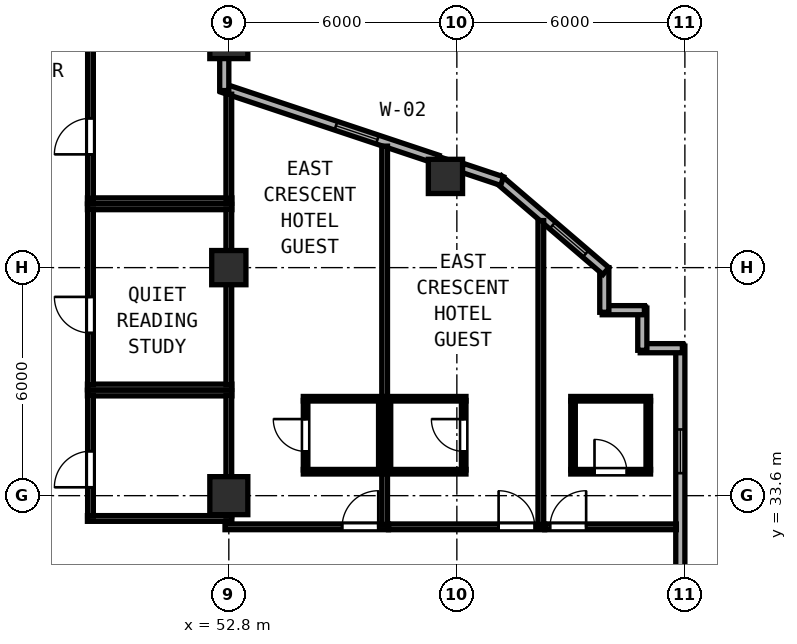
"""IFC4 building model, lengths in metres.
Left out: names, types, materials, properties, quantities, classifications, styles, units other than length and angle.
Written with IfcOpenShell. Run it as: python <this file> out.ifc"""

import sys

from ifc_helpers import new_model, si_unit, direction, frame, frame_2d, origin, origin_2d, place, context, subcontext, project, spatial, rectangle, hollow_rectangle, extrude, element, fill, save


model = new_model("IFC4")
c1 = context("Model", 3, precision=1e-05, world=origin(), true_north=direction((0.0, 1.0)))
c2 = subcontext(c1, "Body", "Model", "MODEL_VIEW")
j1 = project(units=[si_unit("LENGTHUNIT", "METRE"), si_unit("PLANEANGLEUNIT", "RADIAN")], contexts=[c1])
p1 = place(None, origin())
s1 = spatial("IfcSite", under=j1, at=p1, CompositionType="ELEMENT")
p2 = place(p1, origin())
s2 = spatial("IfcBuilding", under=s1, at=p2, CompositionType="ELEMENT")
p3 = place(p2, frame((0.0, 0.0, 152.4)))
s3 = spatial("IfcBuildingStorey", under=s2, at=p3, CompositionType="ELEMENT", Elevation=152.4)
for number, where, z_axis, x_axis in (
    (1, (52.8, 33.6, 0.0), (0.0, 0.0, 1.0), (1.0, 0.0, 0.0)),
    (2, (52.8, 45.6, 0.0), (0.0, 0.0, 1.0), (1.0, 0.0, 0.0)),
):
    element("IfcColumn", number, at=place(p3, frame(where, z_axis=z_axis, x_axis=x_axis)), inside=s3, PredefinedType="COLUMN", context=c2, shape_type="SweptSolid", body=[
        extrude(hollow_rectangle(XDim=1.0, YDim=1.0, WallThickness=0.038, at=origin_2d()), origin(), (0.0, 0.0, 1.0), 3.8),
    ])
for number, where, z_axis, x_axis in (
    (3, (52.8, 39.6, 0.0), (0.0, 0.0, 1.0), (1.0, 0.0, 0.0)),
    (4, (58.5, 42.0, 0.0), (0.0, 0.0, 1.0), (1.0, 0.0, 0.0)),
):
    element("IfcColumn", number, at=place(p3, frame(where, z_axis=z_axis, x_axis=x_axis)), inside=s3, PredefinedType="COLUMN", context=c2, shape_type="SweptSolid", body=[
        extrude(hollow_rectangle(XDim=0.9, YDim=0.9, WallThickness=0.034, at=origin_2d()), origin(), (0.0, 0.0, 1.0), 3.8),
    ])
p4 = place(p3, frame((64.68, 28.092, 0.0), z_axis=(0.0, 0.0, 1.0), x_axis=(0.0, 1.0, 0.0)))
e5 = element("IfcWall", 5, at=p4, inside=s3, PredefinedType="SOLIDWALL", context=c2, shape_type="SweptSolid", body=[
    extrude(rectangle(XDim=9.443, YDim=0.24, at=frame_2d((4.721, 0.0))), origin(), (0.0, 0.0, 1.0), 3.6),
])
p5 = place(p4, frame((0.7, 0.0, 0.85)))
e6 = element("IfcOpeningElement", 6, at=p5, cuts=e5, PredefinedType="OPENING", context=c2, shape_type="SweptSolid", body=[
    extrude(rectangle(XDim=1.15, YDim=1.8, at=frame_2d((0.575, 0.9))), frame((0.0, 0.13, 0.0), z_axis=(0.0, -1.0, 0.0), x_axis=(1.0, 0.0, 0.0)), (0.0, 0.0, 1.0), 0.26),
])
p6 = place(p4, frame((6.1, 0.0, 0.85)))
e7 = element("IfcOpeningElement", 7, at=p6, cuts=e5, PredefinedType="OPENING", context=c2, shape_type="SweptSolid", body=[
    extrude(rectangle(XDim=1.15, YDim=1.8, at=frame_2d((0.575, 0.9))), frame((0.0, 0.13, 0.0), z_axis=(0.0, -1.0, 0.0), x_axis=(1.0, 0.0, 0.0)), (0.0, 0.0, 1.0), 0.26),
])
p7 = place(p3, frame((64.735, 37.48, 0.0), z_axis=(0.0, 0.0, 1.0), x_axis=(-1.0, 0.0, 0.0)))
e8 = element("IfcWall", 8, at=p7, inside=s3, PredefinedType="SOLIDWALL", context=c2, shape_type="SweptSolid", body=[
    extrude(rectangle(XDim=1.11, YDim=0.24, at=frame_2d((0.555, 0.0))), origin(), (0.0, 0.0, 1.0), 3.6),
])
p8 = place(p3, frame((63.68, 37.425, 0.0), z_axis=(0.0, 0.0, 1.0), x_axis=(0.0, 1.0, 0.0)))
e9 = element("IfcWall", 9, at=p8, inside=s3, PredefinedType="SOLIDWALL", context=c2, shape_type="SweptSolid", body=[
    extrude(rectangle(XDim=1.11, YDim=0.24, at=frame_2d((0.555, 0.0))), origin(), (0.0, 0.0, 1.0), 3.6),
])
p9 = place(p3, frame((63.735, 38.48, 0.0), z_axis=(0.0, 0.0, 1.0), x_axis=(-1.0, 0.0, 0.0)))
e10 = element("IfcWall", 10, at=p9, inside=s3, PredefinedType="SOLIDWALL", context=c2, shape_type="SweptSolid", body=[
    extrude(rectangle(XDim=1.11, YDim=0.24, at=frame_2d((0.555, 0.0))), origin(), (0.0, 0.0, 1.0), 3.6),
])
p10 = place(p3, frame((62.68, 38.425, 0.0), z_axis=(0.0, 0.0, 1.0), x_axis=(0.0, 1.0, 0.0)))
e11 = element("IfcWall", 11, at=p10, inside=s3, PredefinedType="SOLIDWALL", context=c2, shape_type="SweptSolid", body=[
    extrude(rectangle(XDim=1.175, YDim=0.24, at=frame_2d((0.587, 0.0))), origin(), (0.0, 0.0, 1.0), 3.6),
])
p11 = place(p3, frame((62.722, 39.509, 0.0), z_axis=(0.0, 0.0, 1.0), x_axis=(-0.759247334792, 0.650802185469, 0.0)))
e12 = element("IfcWall", 12, at=p11, inside=s3, PredefinedType="SOLIDWALL", context=c2, shape_type="SweptSolid", body=[
    extrude(rectangle(XDim=3.719, YDim=0.24, at=frame_2d((1.86, 0.0))), origin(), (0.0, 0.0, 1.0), 3.6),
])
p12 = place(p11, frame((0.7, 0.0, 0.85)))
e13 = element("IfcOpeningElement", 13, at=p12, cuts=e12, PredefinedType="OPENING", context=c2, shape_type="SweptSolid", body=[
    extrude(rectangle(XDim=1.15, YDim=1.8, at=frame_2d((0.575, 0.9))), frame((0.0, 0.13, 0.0), z_axis=(0.0, -1.0, 0.0), x_axis=(1.0, 0.0, 0.0)), (0.0, 0.0, 1.0), 0.26),
])
p13 = place(p3, frame((59.992, 41.876, 0.0), z_axis=(0.0, 0.0, 1.0), x_axis=(-0.948661238983, 0.316293935527, 0.0)))
e14 = element("IfcWall", 14, at=p13, inside=s3, PredefinedType="SOLIDWALL", context=c2, shape_type="SweptSolid", body=[
    extrude(rectangle(XDim=1.107, YDim=0.24, at=frame_2d((0.553, 0.0))), origin(), (0.0, 0.0, 1.0), 3.6),
])
p14 = place(p3, frame((58.295, 42.442, 0.0), z_axis=(0.0, 0.0, 1.0), x_axis=(-0.948687385027, 0.316215504823, 0.0)))
e15 = element("IfcWall", 15, at=p14, inside=s3, PredefinedType="SOLIDWALL", context=c2, shape_type="SweptSolid", body=[
    extrude(rectangle(XDim=5.973, YDim=0.24, at=frame_2d((2.987, 0.0))), origin(), (0.0, 0.0, 1.0), 3.145),
])
p15 = place(p14, frame((1.67, 0.0, 0.85)))
e16 = element("IfcOpeningElement", 16, at=p15, cuts=e15, PredefinedType="OPENING", context=c2, shape_type="SweptSolid", body=[
    extrude(rectangle(XDim=1.15, YDim=1.8, at=frame_2d((0.575, 0.9))), frame((0.0, 0.13, 0.0), z_axis=(0.0, -1.0, 0.0), x_axis=(1.0, 0.0, 0.0)), (0.0, 0.0, 1.0), 0.26),
])
p16 = place(p3, frame((52.68, 44.259, 0.0), z_axis=(0.0, 0.0, 1.0), x_axis=(0.0, 1.0, 0.0)))
e17 = element("IfcWall", 17, at=p16, inside=s3, PredefinedType="SOLIDWALL", context=c2, shape_type="SweptSolid", body=[
    extrude(rectangle(XDim=0.849, YDim=0.24, at=frame_2d((0.425, 0.0))), origin(), (0.0, 0.0, 1.0), 3.145),
])
for number, where, z_axis, x_axis in (
    (18, (49.08, 36.3, 0.0), (0.0, 0.0, 1.0), (1.0, 0.0, 0.0)),
    (19, (49.08, 33.0, 0.0), (0.0, 0.0, 1.0), (1.0, 0.0, 0.0)),
):
    element("IfcWall", number, at=place(p3, frame(where, z_axis=z_axis, x_axis=x_axis)), inside=s3, PredefinedType="PARTITIONING", context=c2, shape_type="SweptSolid", body=[
        extrude(rectangle(XDim=3.8, YDim=0.15, at=frame_2d((1.9, 0.0))), origin(), (0.0, 0.0, 1.0), 3.6),
    ])
p17 = place(p3, frame((49.16, 33.06, 0.0), z_axis=(0.0, 0.0, 1.0), x_axis=(0.0, 1.0, 0.0)))
e20 = element("IfcWall", 20, at=p17, inside=s3, PredefinedType="PARTITIONING", context=c2, shape_type="SweptSolid", body=[
    extrude(rectangle(XDim=3.18, YDim=0.15, at=frame_2d((1.59, 0.0))), origin(), (0.0, 0.0, 1.0), 3.6),
])
p18 = place(p17, frame((0.76, 0.0, 0.0)))
e21 = element("IfcOpeningElement", 21, at=p18, cuts=e20, PredefinedType="OPENING", context=c2, shape_type="SweptSolid", body=[
    extrude(rectangle(XDim=0.95, YDim=2.12, at=frame_2d((0.475, 1.06))), frame((0.0, 0.085, 0.0), z_axis=(0.0, -1.0, 0.0), x_axis=(1.0, 0.0, 0.0)), (0.0, 0.0, 1.0), 0.17),
])
p19 = place(p3, frame((52.8, 33.06, 0.0), z_axis=(0.0, 0.0, 1.0), x_axis=(0.0, 1.0, 0.0)))
e22 = element("IfcWall", 22, at=p19, inside=s3, PredefinedType="PARTITIONING", context=c2, shape_type="SweptSolid", body=[
    extrude(rectangle(XDim=3.18, YDim=0.15, at=frame_2d((1.59, 0.0))), origin(), (0.0, 0.0, 1.0), 3.145),
])
for number, where, z_axis, x_axis in (
    (23, (49.08, 41.2, 0.0), (0.0, 0.0, 1.0), (1.0, 0.0, 0.0)),
    (24, (49.08, 36.46, 0.0), (0.0, 0.0, 1.0), (1.0, 0.0, 0.0)),
):
    element("IfcWall", number, at=place(p3, frame(where, z_axis=z_axis, x_axis=x_axis)), inside=s3, PredefinedType="PARTITIONING", context=c2, shape_type="SweptSolid", body=[
        extrude(rectangle(XDim=3.8, YDim=0.15, at=frame_2d((1.9, 0.0))), origin(), (0.0, 0.0, 1.0), 3.6),
    ])
p20 = place(p3, frame((49.16, 36.52, 0.0), z_axis=(0.0, 0.0, 1.0), x_axis=(0.0, 1.0, 0.0)))
e25 = element("IfcWall", 25, at=p20, inside=s3, PredefinedType="PARTITIONING", context=c2, shape_type="SweptSolid", body=[
    extrude(rectangle(XDim=4.62, YDim=0.15, at=frame_2d((2.31, 0.0))), origin(), (0.0, 0.0, 1.0), 3.6),
])
p21 = place(p20, frame((1.36, 0.0, 0.0)))
e26 = element("IfcOpeningElement", 26, at=p21, cuts=e25, PredefinedType="OPENING", context=c2, shape_type="SweptSolid", body=[
    extrude(rectangle(XDim=0.95, YDim=2.12, at=frame_2d((0.475, 1.06))), frame((0.0, 0.085, 0.0), z_axis=(0.0, -1.0, 0.0), x_axis=(1.0, 0.0, 0.0)), (0.0, 0.0, 1.0), 0.17),
])
p22 = place(p3, frame((52.8, 36.52, 0.0), z_axis=(0.0, 0.0, 1.0), x_axis=(0.0, 1.0, 0.0)))
e27 = element("IfcWall", 27, at=p22, inside=s3, PredefinedType="PARTITIONING", context=c2, shape_type="SweptSolid", body=[
    extrude(rectangle(XDim=4.62, YDim=0.15, at=frame_2d((2.31, 0.0))), origin(), (0.0, 0.0, 1.0), 3.145),
])
p23 = place(p3, frame((49.08, 41.36, 0.0), z_axis=(0.0, 0.0, 1.0), x_axis=(1.0, 0.0, 0.0)))
e28 = element("IfcWall", 28, at=p23, inside=s3, PredefinedType="PARTITIONING", context=c2, shape_type="SweptSolid", body=[
    extrude(rectangle(XDim=3.8, YDim=0.15, at=frame_2d((1.9, 0.0))), origin(), (0.0, 0.0, 1.0), 3.6),
])
p24 = place(p3, frame((49.16, 41.42, 0.0), z_axis=(0.0, 0.0, 1.0), x_axis=(0.0, 1.0, 0.0)))
e29 = element("IfcWall", 29, at=p24, inside=s3, PredefinedType="PARTITIONING", context=c2, shape_type="SweptSolid", body=[
    extrude(rectangle(XDim=4.54, YDim=0.15, at=frame_2d((2.27, 0.0))), origin(), (0.0, 0.0, 1.0), 3.6),
])
p25 = place(p24, frame((1.16, 0.0, 0.0)))
e30 = element("IfcOpeningElement", 30, at=p25, cuts=e29, PredefinedType="OPENING", context=c2, shape_type="SweptSolid", body=[
    extrude(rectangle(XDim=0.95, YDim=2.12, at=frame_2d((0.475, 1.06))), frame((0.0, 0.085, 0.0), z_axis=(0.0, -1.0, 0.0), x_axis=(1.0, 0.0, 0.0)), (0.0, 0.0, 1.0), 0.17),
])
p26 = place(p3, frame((52.8, 41.42, 0.0), z_axis=(0.0, 0.0, 1.0), x_axis=(0.0, 1.0, 0.0)))
e31 = element("IfcWall", 31, at=p26, inside=s3, PredefinedType="PARTITIONING", context=c2, shape_type="SweptSolid", body=[
    extrude(rectangle(XDim=2.743, YDim=0.15, at=frame_2d((1.372, 0.0))), origin(), (0.0, 0.0, 1.0), 3.145),
])
p27 = place(p3, frame((52.7, 32.78, 0.0), z_axis=(0.0, 0.0, 1.0), x_axis=(1.0, 0.0, 0.0)))
e32 = element("IfcWall", 32, at=p27, inside=s3, PredefinedType="PARTITIONING", context=c2, shape_type="SweptSolid", body=[
    extrude(rectangle(XDim=4.3, YDim=0.15, at=frame_2d((2.15, 0.0))), origin(), (0.0, 0.0, 1.0), 3.6),
])
p28 = place(p27, frame((3.082, 0.0, 0.0)))
e33 = element("IfcOpeningElement", 33, at=p28, cuts=e32, PredefinedType="OPENING", context=c2, shape_type="SweptSolid", body=[
    extrude(rectangle(XDim=0.95, YDim=2.15, at=frame_2d((0.475, 1.075))), frame((0.0, 0.085, 0.0), z_axis=(0.0, -1.0, 0.0), x_axis=(1.0, 0.0, 0.0)), (0.0, 0.0, 1.0), 0.17),
])
p29 = place(p3, frame((56.9, 32.84, 0.0), z_axis=(0.0, 0.0, 1.0), x_axis=(0.0, 1.0, 0.0)))
e34 = element("IfcWall", 34, at=p29, inside=s3, PredefinedType="PARTITIONING", context=c2, shape_type="SweptSolid", body=[
    extrude(rectangle(XDim=9.956, YDim=0.15, at=frame_2d((4.978, 0.0))), origin(), (0.0, 0.0, 1.0), 3.6),
])
for number, where, z_axis, x_axis in (
    (35, (54.76, 36.15, 0.0), (0.0, 0.0, 1.0), (1.0, 0.0, 0.0)),
    (36, (54.76, 34.23, 0.0), (0.0, 0.0, 1.0), (1.0, 0.0, 0.0)),
):
    element("IfcWall", number, at=place(p3, frame(where, z_axis=z_axis, x_axis=x_axis)), inside=s3, PredefinedType="PARTITIONING", context=c2, shape_type="SweptSolid", body=[
        extrude(rectangle(XDim=2.08, YDim=0.12, at=frame_2d((1.04, 0.0))), origin(), (0.0, 0.0, 1.0), 3.6),
    ])
p30 = place(p3, frame((54.82, 34.275, 0.0), z_axis=(0.0, 0.0, 1.0), x_axis=(0.0, 1.0, 0.0)))
e37 = element("IfcWall", 37, at=p30, inside=s3, PredefinedType="PARTITIONING", context=c2, shape_type="SweptSolid", body=[
    extrude(rectangle(XDim=1.83, YDim=0.12, at=frame_2d((0.915, 0.0))), origin(), (0.0, 0.0, 1.0), 3.6),
])
p31 = place(p30, frame((1.34, 0.0, 0.0), z_axis=(0.0, 0.0, 1.0), x_axis=(-1.0, 0.0, 0.0)))
e38 = element("IfcOpeningElement", 38, at=p31, cuts=e37, PredefinedType="OPENING", context=c2, shape_type="SweptSolid", body=[
    extrude(rectangle(XDim=0.85, YDim=2.1, at=frame_2d((0.425, 1.05))), frame((0.0, 0.07, 0.0), z_axis=(0.0, -1.0, 0.0), x_axis=(1.0, 0.0, 0.0)), (0.0, 0.0, 1.0), 0.14),
])
p32 = place(p3, frame((56.8, 34.275, 0.0), z_axis=(0.0, 0.0, 1.0), x_axis=(0.0, 1.0, 0.0)))
e39 = element("IfcWall", 39, at=p32, inside=s3, PredefinedType="PARTITIONING", context=c2, shape_type="SweptSolid", body=[
    extrude(rectangle(XDim=1.83, YDim=0.12, at=frame_2d((0.915, 0.0))), origin(), (0.0, 0.0, 1.0), 3.6),
])
p33 = place(p3, frame((57.002, 32.78, 0.0), z_axis=(0.0, 0.0, 1.0), x_axis=(1.0, 0.0, 0.0)))
e40 = element("IfcWall", 40, at=p33, inside=s3, PredefinedType="PARTITIONING", context=c2, shape_type="SweptSolid", body=[
    extrude(rectangle(XDim=4.108, YDim=0.15, at=frame_2d((2.054, 0.0))), origin(), (0.0, 0.0, 1.0), 3.6),
])
p34 = place(p33, frame((2.896, 0.0, 0.0)))
e41 = element("IfcOpeningElement", 41, at=p34, cuts=e40, PredefinedType="OPENING", context=c2, shape_type="SweptSolid", body=[
    extrude(rectangle(XDim=0.95, YDim=2.15, at=frame_2d((0.475, 1.075))), frame((0.0, 0.085, 0.0), z_axis=(0.0, -1.0, 0.0), x_axis=(1.0, 0.0, 0.0)), (0.0, 0.0, 1.0), 0.17),
])
p35 = place(p3, frame((61.01, 32.84, 0.0), z_axis=(0.0, 0.0, 1.0), x_axis=(0.0, 1.0, 0.0)))
e42 = element("IfcWall", 42, at=p35, inside=s3, PredefinedType="PARTITIONING", context=c2, shape_type="SweptSolid", body=[
    extrude(rectangle(XDim=7.998, YDim=0.15, at=frame_2d((3.999, 0.0))), origin(), (0.0, 0.0, 1.0), 3.6),
])
for number, where, z_axis, x_axis in (
    (43, (56.96, 36.15, 0.0), (0.0, 0.0, 1.0), (1.0, 0.0, 0.0)),
    (44, (56.96, 34.23, 0.0), (0.0, 0.0, 1.0), (1.0, 0.0, 0.0)),
):
    element("IfcWall", number, at=place(p3, frame(where, z_axis=z_axis, x_axis=x_axis)), inside=s3, PredefinedType="PARTITIONING", context=c2, shape_type="SweptSolid", body=[
        extrude(rectangle(XDim=2.08, YDim=0.12, at=frame_2d((1.04, 0.0))), origin(), (0.0, 0.0, 1.0), 3.6),
    ])
p36 = place(p3, frame((57.0, 34.275, 0.0), z_axis=(0.0, 0.0, 1.0), x_axis=(0.0, 1.0, 0.0)))
e45 = element("IfcWall", 45, at=p36, inside=s3, PredefinedType="PARTITIONING", context=c2, shape_type="SweptSolid", body=[
    extrude(rectangle(XDim=1.83, YDim=0.12, at=frame_2d((0.915, 0.0))), origin(), (0.0, 0.0, 1.0), 3.6),
])
p37 = place(p3, frame((58.98, 34.275, 0.0), z_axis=(0.0, 0.0, 1.0), x_axis=(0.0, 1.0, 0.0)))
e46 = element("IfcWall", 46, at=p37, inside=s3, PredefinedType="PARTITIONING", context=c2, shape_type="SweptSolid", body=[
    extrude(rectangle(XDim=1.83, YDim=0.12, at=frame_2d((0.915, 0.0))), origin(), (0.0, 0.0, 1.0), 3.6),
])
p38 = place(p37, frame((0.49, 0.0, 0.0)))
e47 = element("IfcOpeningElement", 47, at=p38, cuts=e46, PredefinedType="OPENING", context=c2, shape_type="SweptSolid", body=[
    extrude(rectangle(XDim=0.85, YDim=2.1, at=frame_2d((0.425, 1.05))), frame((0.0, 0.07, 0.0), z_axis=(0.0, -1.0, 0.0), x_axis=(1.0, 0.0, 0.0)), (0.0, 0.0, 1.0), 0.14),
])
p39 = place(p3, frame((61.112, 32.78, 0.0), z_axis=(0.0, 0.0, 1.0), x_axis=(1.0, 0.0, 0.0)))
e48 = element("IfcWall", 48, at=p39, inside=s3, PredefinedType="PARTITIONING", context=c2, shape_type="SweptSolid", body=[
    extrude(rectangle(XDim=3.463, YDim=0.15, at=frame_2d((1.731, 0.0))), origin(), (0.0, 0.0, 1.0), 3.6),
])
p40 = place(p39, frame((0.14, 0.0, 0.0)))
e49 = element("IfcOpeningElement", 49, at=p40, cuts=e48, PredefinedType="OPENING", context=c2, shape_type="SweptSolid", body=[
    extrude(rectangle(XDim=0.95, YDim=2.15, at=frame_2d((0.475, 1.075))), frame((0.0, 0.085, 0.0), z_axis=(0.0, -1.0, 0.0), x_axis=(1.0, 0.0, 0.0)), (0.0, 0.0, 1.0), 0.17),
])
p41 = place(p3, frame((61.797, 36.15, 0.0), z_axis=(0.0, 0.0, 1.0), x_axis=(1.0, 0.0, 0.0)))
e50 = element("IfcWall", 50, at=p41, inside=s3, PredefinedType="PARTITIONING", context=c2, shape_type="SweptSolid", body=[
    extrude(rectangle(XDim=2.1, YDim=0.12, at=frame_2d((1.05, 0.0))), origin(), (0.0, 0.0, 1.0), 3.6),
])
p42 = place(p3, frame((61.797, 34.23, 0.0), z_axis=(0.0, 0.0, 1.0), x_axis=(1.0, 0.0, 0.0)))
e51 = element("IfcWall", 51, at=p42, inside=s3, PredefinedType="PARTITIONING", context=c2, shape_type="SweptSolid", body=[
    extrude(rectangle(XDim=2.1, YDim=0.12, at=frame_2d((1.05, 0.0))), origin(), (0.0, 0.0, 1.0), 3.6),
])
p43 = place(p42, frame((0.625, 0.0, 0.0)))
e52 = element("IfcOpeningElement", 52, at=p43, cuts=e51, PredefinedType="OPENING", context=c2, shape_type="SweptSolid", body=[
    extrude(rectangle(XDim=0.85, YDim=2.1, at=frame_2d((0.425, 1.05))), frame((0.0, 0.07, 0.0), z_axis=(0.0, -1.0, 0.0), x_axis=(1.0, 0.0, 0.0)), (0.0, 0.0, 1.0), 0.14),
])
for number, where, z_axis, x_axis in (
    (53, (61.857, 34.275, 0.0), (0.0, 0.0, 1.0), (0.0, 1.0, 0.0)),
    (54, (63.837, 34.275, 0.0), (0.0, 0.0, 1.0), (0.0, 1.0, 0.0)),
):
    element("IfcWall", number, at=place(p3, frame(where, z_axis=z_axis, x_axis=x_axis)), inside=s3, PredefinedType="PARTITIONING", context=c2, shape_type="SweptSolid", body=[
        extrude(rectangle(XDim=1.83, YDim=0.12, at=frame_2d((0.915, 0.0))), origin(), (0.0, 0.0, 1.0), 3.6),
    ])
p44 = place(p6, origin())
e55 = element("IfcWindow", 55, at=p44, inside=s3, PartitioningType="SINGLE_PANEL", PredefinedType="WINDOW", context=c2, shape_type="SweptSolid", body=[
    extrude(rectangle(XDim=1.15, YDim=1.8, at=frame_2d((0.575, 0.9))), frame((0.0, 0.03, 0.0), z_axis=(0.0, -1.0, 0.0), x_axis=(1.0, 0.0, 0.0)), (0.0, 0.0, 1.0), 0.06),
])
fill(e7, e55)
p45 = place(p12, origin())
e56 = element("IfcWindow", 56, at=p45, inside=s3, PartitioningType="SINGLE_PANEL", PredefinedType="WINDOW", context=c2, shape_type="SweptSolid", body=[
    extrude(rectangle(XDim=1.15, YDim=1.8, at=frame_2d((0.575, 0.9))), frame((0.0, 0.03, 0.0), z_axis=(0.0, -1.0, 0.0), x_axis=(1.0, 0.0, 0.0)), (0.0, 0.0, 1.0), 0.06),
])
fill(e13, e56)
p46 = place(p15, origin())
e57 = element("IfcWindow", 57, at=p46, inside=s3, PartitioningType="SINGLE_PANEL", PredefinedType="WINDOW", context=c2, shape_type="SweptSolid", body=[
    extrude(rectangle(XDim=1.15, YDim=1.8, at=frame_2d((0.575, 0.9))), frame((0.0, 0.03, 0.0), z_axis=(0.0, -1.0, 0.0), x_axis=(1.0, 0.0, 0.0)), (0.0, 0.0, 1.0), 0.06),
])
fill(e16, e57)
p47 = place(p18, origin())
e58 = element("IfcDoor", 58, at=p47, inside=s3, OperationType="SINGLE_SWING_LEFT", PredefinedType="DOOR", context=c2, shape_type="SweptSolid", body=[
    extrude(rectangle(XDim=0.95, YDim=2.12, at=frame_2d((0.475, 1.06))), frame((0.0, 0.025, 0.0), z_axis=(0.0, -1.0, 0.0), x_axis=(1.0, 0.0, 0.0)), (0.0, 0.0, 1.0), 0.05),
])
fill(e21, e58)
p48 = place(p21, origin())
e59 = element("IfcDoor", 59, at=p48, inside=s3, OperationType="SINGLE_SWING_RIGHT", PredefinedType="DOOR", context=c2, shape_type="SweptSolid", body=[
    extrude(rectangle(XDim=0.95, YDim=2.12, at=frame_2d((0.475, 1.06))), frame((0.0, 0.025, 0.0), z_axis=(0.0, -1.0, 0.0), x_axis=(1.0, 0.0, 0.0)), (0.0, 0.0, 1.0), 0.05),
])
fill(e26, e59)
p49 = place(p25, origin())
e60 = element("IfcDoor", 60, at=p49, inside=s3, OperationType="SINGLE_SWING_LEFT", PredefinedType="DOOR", context=c2, shape_type="SweptSolid", body=[
    extrude(rectangle(XDim=0.95, YDim=2.12, at=frame_2d((0.475, 1.06))), frame((0.0, 0.025, 0.0), z_axis=(0.0, -1.0, 0.0), x_axis=(1.0, 0.0, 0.0)), (0.0, 0.0, 1.0), 0.05),
])
fill(e30, e60)
p50 = place(p28, origin())
e61 = element("IfcDoor", 61, at=p50, inside=s3, OperationType="SINGLE_SWING_RIGHT", PredefinedType="DOOR", context=c2, shape_type="SweptSolid", body=[
    extrude(rectangle(XDim=0.95, YDim=2.15, at=frame_2d((0.475, 1.075))), frame((0.0, 0.025, 0.0), z_axis=(0.0, -1.0, 0.0), x_axis=(1.0, 0.0, 0.0)), (0.0, 0.0, 1.0), 0.05),
])
fill(e33, e61)
p51 = place(p31, origin())
e62 = element("IfcDoor", 62, at=p51, inside=s3, OperationType="SINGLE_SWING_LEFT", PredefinedType="DOOR", context=c2, shape_type="SweptSolid", body=[
    extrude(rectangle(XDim=0.85, YDim=2.1, at=frame_2d((0.425, 1.05))), frame((0.0, 0.025, 0.0), z_axis=(0.0, -1.0, 0.0), x_axis=(1.0, 0.0, 0.0)), (0.0, 0.0, 1.0), 0.05),
])
fill(e38, e62)
p52 = place(p34, origin())
e63 = element("IfcDoor", 63, at=p52, inside=s3, OperationType="SINGLE_SWING_LEFT", PredefinedType="DOOR", context=c2, shape_type="SweptSolid", body=[
    extrude(rectangle(XDim=0.95, YDim=2.15, at=frame_2d((0.475, 1.075))), frame((0.0, 0.025, 0.0), z_axis=(0.0, -1.0, 0.0), x_axis=(1.0, 0.0, 0.0)), (0.0, 0.0, 1.0), 0.05),
])
fill(e41, e63)
p53 = place(p38, origin())
e64 = element("IfcDoor", 64, at=p53, inside=s3, OperationType="SINGLE_SWING_RIGHT", PredefinedType="DOOR", context=c2, shape_type="SweptSolid", body=[
    extrude(rectangle(XDim=0.85, YDim=2.1, at=frame_2d((0.425, 1.05))), frame((0.0, 0.025, 0.0), z_axis=(0.0, -1.0, 0.0), x_axis=(1.0, 0.0, 0.0)), (0.0, 0.0, 1.0), 0.05),
])
fill(e47, e64)
p54 = place(p40, origin())
e65 = element("IfcDoor", 65, at=p54, inside=s3, OperationType="SINGLE_SWING_RIGHT", PredefinedType="DOOR", context=c2, shape_type="SweptSolid", body=[
    extrude(rectangle(XDim=0.95, YDim=2.15, at=frame_2d((0.475, 1.075))), frame((0.0, 0.025, 0.0), z_axis=(0.0, -1.0, 0.0), x_axis=(1.0, 0.0, 0.0)), (0.0, 0.0, 1.0), 0.05),
])
fill(e49, e65)
p55 = place(p43, origin())
e66 = element("IfcDoor", 66, at=p55, inside=s3, OperationType="SINGLE_SWING_LEFT", PredefinedType="DOOR", context=c2, shape_type="SweptSolid", body=[
    extrude(rectangle(XDim=0.85, YDim=2.1, at=frame_2d((0.425, 1.05))), frame((0.0, 0.025, 0.0), z_axis=(0.0, -1.0, 0.0), x_axis=(1.0, 0.0, 0.0)), (0.0, 0.0, 1.0), 0.05),
])
fill(e52, e66)
save(model, sys.argv[1])
